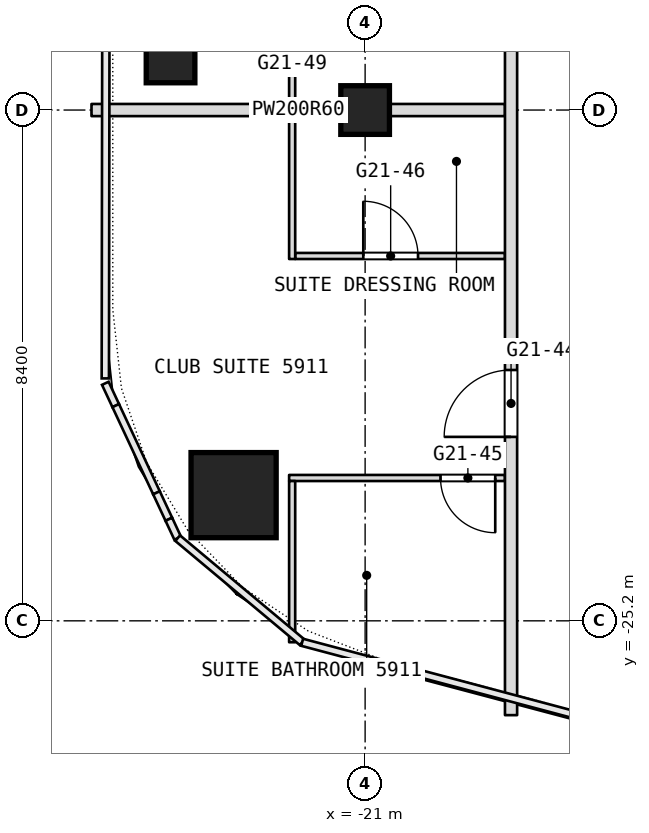
"""IFC4 building model, lengths in metres.
Left out: names, types, materials, properties, quantities, classifications, styles, units other than length and angle.
Written with IfcOpenShell. Run it as: python <this file> out.ifc"""

import sys

from ifc_helpers import new_model, si_unit, direction, frame, frame_2d, origin, origin_2d, place, context, subcontext, project, spatial, rectangle, extrude, element, fill, save


model = new_model("IFC4")
c1 = context("Model", 3, precision=1e-05, world=origin(), true_north=direction((0.0, 1.0)))
c2 = subcontext(c1, "Body", "Model", "MODEL_VIEW")
j1 = project(units=[si_unit("LENGTHUNIT", "METRE"), si_unit("PLANEANGLEUNIT", "RADIAN")], contexts=[c1])
p1 = place(None, origin())
s1 = spatial("IfcSite", under=j1, at=p1, CompositionType="ELEMENT")
p2 = place(p1, origin())
s2 = spatial("IfcBuilding", under=s1, at=p2, CompositionType="ELEMENT")
p3 = place(p2, frame((0.0, 0.0, 248.9)))
s3 = spatial("IfcBuildingStorey", under=s2, at=p3, CompositionType="ELEMENT", Elevation=248.9)
p4 = place(p3, frame((-23.163, -23.133, 0.0), z_axis=(0.0, 0.0, 1.0), x_axis=(1.0, 0.0, 0.0)))
e1 = element("IfcColumn", 1, at=p4, inside=s3, PredefinedType="COLUMN", context=c2, shape_type="SweptSolid", body=[
    extrude(rectangle(XDim=1.4, YDim=1.4, at=origin_2d()), origin(), (0.0, 0.0, 1.0), 3.6),
])
for number, where, z_axis, x_axis in (
    (2, (-21.0, -16.8, 0.0), (0.0, 0.0, 1.0), (1.0, 0.0, 0.0)),
    (3, (-24.2, -15.952, 0.0), (0.0, 0.0, 1.0), (1.0, 0.0, 0.0)),
):
    element("IfcColumn", number, at=place(p3, frame(where, z_axis=z_axis, x_axis=x_axis)), inside=s3, PredefinedType="COLUMN", context=c2, shape_type="SweptSolid", body=[
        extrude(rectangle(XDim=0.8, YDim=0.8, at=origin_2d()), origin(), (0.0, 0.0, 1.0), 3.6),
    ])
p5 = place(p3, frame((-22.25, -22.851, 0.0), z_axis=(0.0, 0.0, 1.0), x_axis=(1.0, 0.0, 0.0)))
e4 = element("IfcWall", 4, at=p5, inside=s3, PredefinedType="PARTITIONING", context=c2, shape_type="SweptSolid", body=[
    extrude(rectangle(XDim=3.55, YDim=0.1, at=frame_2d((1.775, 0.0))), origin(), (0.0, 0.0, 1.0), 3.3),
])
p6 = place(p5, frame((2.49, 0.0, 0.0)))
e5 = element("IfcOpeningElement", 5, at=p6, cuts=e4, PredefinedType="OPENING", context=c2, shape_type="SweptSolid", body=[
    extrude(rectangle(XDim=0.9, YDim=2.1, at=frame_2d((0.45, 1.05))), frame((0.0, 0.05, 0.0), z_axis=(0.0, -1.0, 0.0), x_axis=(1.0, 0.0, 0.0)), (0.0, 0.0, 1.0), 0.1),
])
p7 = place(p3, frame((-22.15, -19.2, 0.0), z_axis=(0.0, 0.0, 1.0), x_axis=(1.0, 0.0, 0.0)))
e6 = element("IfcWall", 6, at=p7, inside=s3, PredefinedType="PARTITIONING", context=c2, shape_type="SweptSolid", body=[
    extrude(rectangle(XDim=3.45, YDim=0.1, at=frame_2d((1.725, 0.0))), origin(), (0.0, 0.0, 1.0), 3.3),
])
p8 = place(p7, frame((1.12, 0.0, 0.0)))
e7 = element("IfcOpeningElement", 7, at=p8, cuts=e6, PredefinedType="OPENING", context=c2, shape_type="SweptSolid", body=[
    extrude(rectangle(XDim=0.9, YDim=2.1, at=frame_2d((0.45, 1.05))), frame((0.0, 0.05, 0.0), z_axis=(0.0, -1.0, 0.0), x_axis=(1.0, 0.0, 0.0)), (0.0, 0.0, 1.0), 0.1),
])
p9 = place(p3, frame((-25.5, -16.8, 0.0), z_axis=(0.0, 0.0, 1.0), x_axis=(1.0, 0.0, 0.0)))
e8 = element("IfcWall", 8, at=p9, inside=s3, PredefinedType="PARTITIONING", context=c2, shape_type="SweptSolid", body=[
    extrude(rectangle(XDim=6.8, YDim=0.2, at=frame_2d((3.4, 0.0))), origin(), (0.0, 0.0, 1.0), 2.9),
])
p10 = place(p3, frame((-18.6, -26.751, 0.0), z_axis=(0.0, 0.0, 1.0), x_axis=(0.0, 1.0, 0.0)))
e9 = element("IfcWall", 9, at=p10, inside=s3, PredefinedType="PARTITIONING", context=c2, shape_type="SweptSolid", body=[
    extrude(rectangle(XDim=49.091, YDim=0.2, at=frame_2d((24.545, 0.0))), origin(), (0.0, 0.0, 1.0), 3.3),
])
p11 = place(p10, frame((4.576, 0.0, 0.0)))
e10 = element("IfcOpeningElement", 10, at=p11, cuts=e9, PredefinedType="OPENING", context=c2, shape_type="SweptSolid", body=[
    extrude(rectangle(XDim=1.1, YDim=2.1, at=frame_2d((0.55, 1.05))), frame((0.0, 0.1, 0.0), z_axis=(0.0, -1.0, 0.0), x_axis=(1.0, 0.0, 0.0)), (0.0, 0.0, 1.0), 0.2),
])
p12 = place(p10, frame((13.551, 0.0, 0.0)))
e11 = element("IfcOpeningElement", 11, at=p12, cuts=e9, PredefinedType="OPENING", context=c2, shape_type="SweptSolid", body=[
    extrude(rectangle(XDim=1.1, YDim=2.1, at=frame_2d((0.55, 1.05))), frame((0.0, 0.1, 0.0), z_axis=(0.0, -1.0, 0.0), x_axis=(1.0, 0.0, 0.0)), (0.0, 0.0, 1.0), 0.2),
])
p13 = place(p10, frame((22.051, 0.0, 0.0)))
e12 = element("IfcOpeningElement", 12, at=p13, cuts=e9, PredefinedType="OPENING", context=c2, shape_type="SweptSolid", body=[
    extrude(rectangle(XDim=1.1, YDim=2.1, at=frame_2d((0.55, 1.05))), frame((0.0, 0.1, 0.0), z_axis=(0.0, -1.0, 0.0), x_axis=(1.0, 0.0, 0.0)), (0.0, 0.0, 1.0), 0.2),
])
p14 = place(p10, frame((30.351, 0.0, 0.0)))
e13 = element("IfcOpeningElement", 13, at=p14, cuts=e9, PredefinedType="OPENING", context=c2, shape_type="SweptSolid", body=[
    extrude(rectangle(XDim=1.1, YDim=2.1, at=frame_2d((0.55, 1.05))), frame((0.0, 0.1, 0.0), z_axis=(0.0, -1.0, 0.0), x_axis=(1.0, 0.0, 0.0)), (0.0, 0.0, 1.0), 0.2),
])
p15 = place(p10, frame((38.851, 0.0, 0.0)))
e14 = element("IfcOpeningElement", 14, at=p15, cuts=e9, PredefinedType="OPENING", context=c2, shape_type="SweptSolid", body=[
    extrude(rectangle(XDim=1.1, YDim=2.1, at=frame_2d((0.55, 1.05))), frame((0.0, 0.1, 0.0), z_axis=(0.0, -1.0, 0.0), x_axis=(1.0, 0.0, 0.0)), (0.0, 0.0, 1.0), 0.2),
])
p16 = place(p10, frame((44.051, 0.0, 0.0)))
e15 = element("IfcOpeningElement", 15, at=p16, cuts=e9, PredefinedType="OPENING", context=c2, shape_type="SweptSolid", body=[
    extrude(rectangle(XDim=1.0, YDim=2.1, at=frame_2d((0.5, 1.05))), frame((0.0, 0.1, 0.0), z_axis=(0.0, -1.0, 0.0), x_axis=(1.0, 0.0, 0.0)), (0.0, 0.0, 1.0), 0.2),
])
p17 = place(p3, frame((-22.2, -25.552, 0.0), z_axis=(0.0, 0.0, 1.0), x_axis=(0.0, 1.0, 0.0)))
e16 = element("IfcWall", 16, at=p17, inside=s3, PredefinedType="PARTITIONING", context=c2, shape_type="SweptSolid", body=[
    extrude(rectangle(XDim=2.651, YDim=0.1, at=frame_2d((1.326, 0.0))), origin(), (0.0, 0.0, 1.0), 3.3),
])
p18 = place(p3, frame((-22.2, -19.25, 0.0), z_axis=(0.0, 0.0, 1.0), x_axis=(0.0, 1.0, 0.0)))
e17 = element("IfcWall", 17, at=p18, inside=s3, PredefinedType="PARTITIONING", context=c2, shape_type="SweptSolid", body=[
    extrude(rectangle(XDim=4.8, YDim=0.1, at=frame_2d((2.4, 0.0))), origin(), (0.0, 0.0, 1.0), 3.3),
])
p19 = place(p18, frame((3.75, 0.0, 0.0)))
e18 = element("IfcOpeningElement", 18, at=p19, cuts=e17, PredefinedType="OPENING", context=c2, shape_type="SweptSolid", body=[
    extrude(rectangle(XDim=0.9, YDim=2.1, at=frame_2d((0.45, 1.05))), frame((0.0, 0.05, 0.0), z_axis=(0.0, -1.0, 0.0), x_axis=(1.0, 0.0, 0.0)), (0.0, 0.0, 1.0), 0.1),
])
p20 = place(p6, origin())
e19 = element("IfcDoor", 19, at=p20, inside=s3, OperationType="SINGLE_SWING_LEFT", PredefinedType="DOOR", context=c2, shape_type="SweptSolid", body=[
    extrude(rectangle(XDim=0.9, YDim=2.1, at=frame_2d((0.45, 1.05))), frame((0.0, 0.025, 0.0), z_axis=(0.0, -1.0, 0.0), x_axis=(1.0, 0.0, 0.0)), (0.0, 0.0, 1.0), 0.05),
])
fill(e5, e19)
p21 = place(p8, origin())
e20 = element("IfcDoor", 20, at=p21, inside=s3, OperationType="SINGLE_SWING_LEFT", PredefinedType="DOOR", context=c2, shape_type="SweptSolid", body=[
    extrude(rectangle(XDim=0.9, YDim=2.1, at=frame_2d((0.45, 1.05))), frame((0.0, 0.025, 0.0), z_axis=(0.0, -1.0, 0.0), x_axis=(1.0, 0.0, 0.0)), (0.0, 0.0, 1.0), 0.05),
])
fill(e7, e20)
p22 = place(p11, origin())
e21 = element("IfcDoor", 21, at=p22, inside=s3, OperationType="SINGLE_SWING_LEFT", PredefinedType="DOOR", context=c2, shape_type="SweptSolid", body=[
    extrude(rectangle(XDim=1.1, YDim=2.1, at=frame_2d((0.55, 1.05))), frame((0.0, 0.025, 0.0), z_axis=(0.0, -1.0, 0.0), x_axis=(1.0, 0.0, 0.0)), (0.0, 0.0, 1.0), 0.05),
])
fill(e10, e21)
save(model, sys.argv[1])
